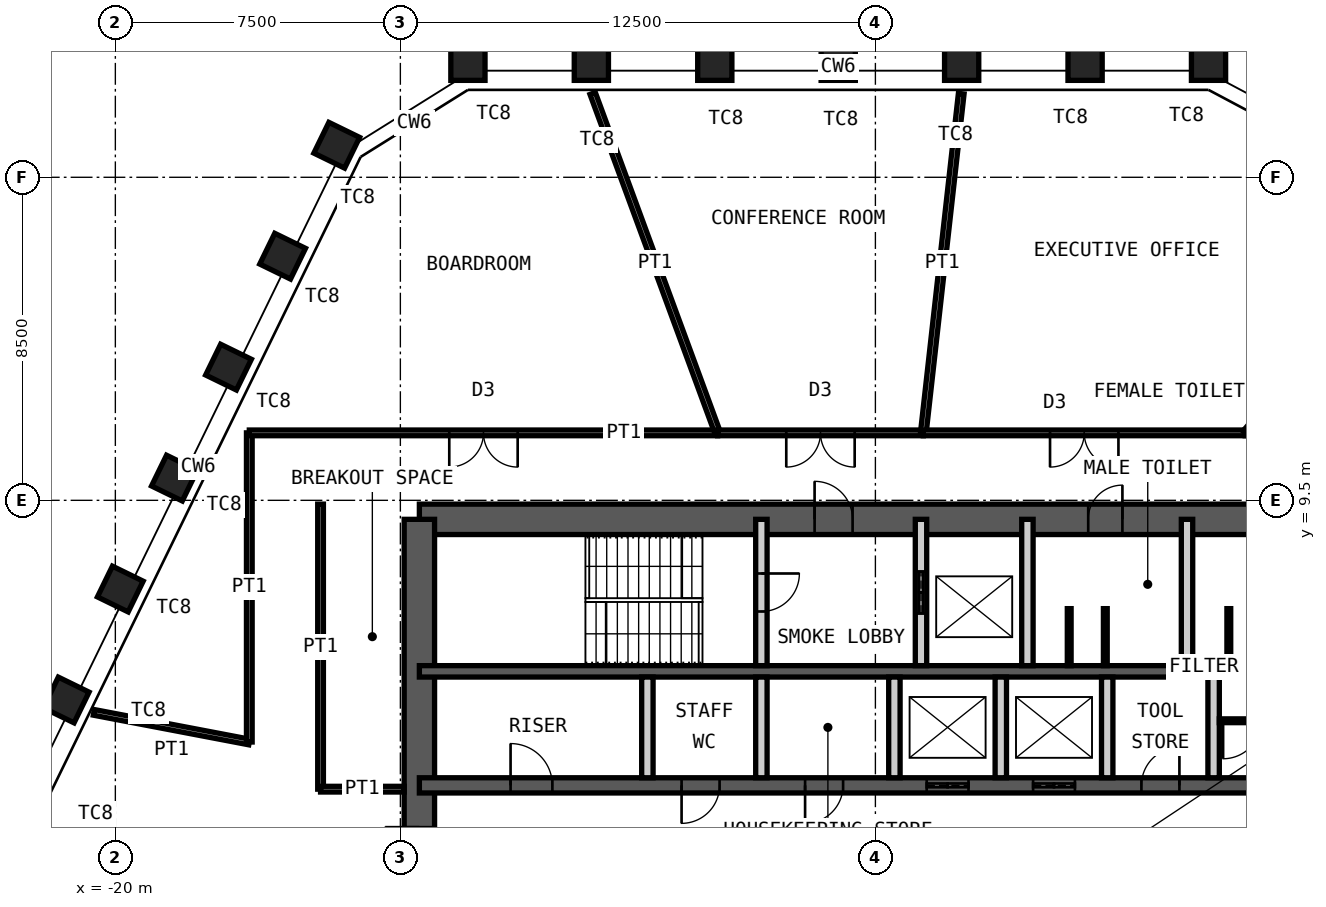
"""IFC4 building model, lengths in metres.
Left out: names, types, materials, properties, quantities, classifications, styles, units other than length and angle.
Written with IfcOpenShell. Run it as: python <this file> out.ifc"""

import sys

from ifc_helpers import new_model, si_unit, direction, frame, frame_2d, origin, origin_2d, place, context, subcontext, project, spatial, rectangle, hollow_rectangle, extrude, element, fill, save


model = new_model("IFC4")
c1 = context("Model", 3, precision=1e-05, world=origin(), true_north=direction((0.0, 1.0)))
c2 = subcontext(c1, "Body", "Model", "MODEL_VIEW")
j1 = project(units=[si_unit("LENGTHUNIT", "METRE"), si_unit("PLANEANGLEUNIT", "RADIAN")], contexts=[c1])
p1 = place(None, origin())
s1 = spatial("IfcSite", under=j1, at=p1, CompositionType="ELEMENT")
p2 = place(p1, origin())
s2 = spatial("IfcBuilding", under=s1, at=p2, CompositionType="ELEMENT")
p3 = place(p2, frame((0.0, 0.0, 333.4)))
s3 = spatial("IfcBuildingStorey", under=s2, at=p3, CompositionType="ELEMENT", Elevation=333.4)
for number, where, z_axis, x_axis in (
    (1, (-10.722, 21.0, 0.0), (0.0, 0.0, 1.0), (-1.0, 0.0, 0.0)),
    (2, (-7.474, 21.0, 0.0), (0.0, 0.0, 1.0), (-1.0, 0.0, 0.0)),
    (3, (-4.226, 21.0, 0.0), (0.0, 0.0, 1.0), (-1.0, 0.0, 0.0)),
    (4, (-0.978, 21.0, 0.0), (0.0, 0.0, 1.0), (-1.0, 0.0, 0.0)),
    (5, (2.27, 21.0, 0.0), (0.0, 0.0, 1.0), (-1.0, 0.0, 0.0)),
    (6, (5.518, 21.0, 0.0), (0.0, 0.0, 1.0), (-1.0, 0.0, 0.0)),
    (7, (8.766, 21.0, 0.0), (0.0, 0.0, 1.0), (-1.0, 0.0, 0.0)),
    (8, (-21.293, 4.246, 0.0), (0.0, 0.0, 1.0), (-0.438, -0.899, 0.0)),
    (9, (-19.87, 7.166, 0.0), (0.0, 0.0, 1.0), (-0.438, -0.899, 0.0)),
    (10, (-18.446, 10.085, 0.0), (0.0, 0.0, 1.0), (-0.438, -0.899, 0.0)),
    (11, (-17.022, 13.004, 0.0), (0.0, 0.0, 1.0), (-0.438, -0.899, 0.0)),
    (12, (-15.598, 15.924, 0.0), (0.0, 0.0, 1.0), (-0.438, -0.899, 0.0)),
    (13, (-14.174, 18.843, 0.0), (0.0, 0.0, 1.0), (-0.438, -0.899, 0.0)),
):
    element("IfcColumn", number, at=place(p3, frame(where, z_axis=z_axis, x_axis=x_axis)), inside=s3, PredefinedType="COLUMN", context=c2, shape_type="SweptSolid", body=[
        extrude(hollow_rectangle(XDim=0.9, YDim=0.9, WallThickness=0.05, at=origin_2d()), origin(), (0.0, 0.0, 1.0), 4.2),
    ])
p4 = place(p3, frame((-12.0, 9.0, 0.0), z_axis=(0.0, 0.0, 1.0), x_axis=(1.0, 0.0, 0.0)))
e14 = element("IfcWall", 14, at=p4, inside=s3, PredefinedType="SHEAR", context=c2, shape_type="SweptSolid", body=[
    extrude(rectangle(XDim=24.0, YDim=0.8, at=frame_2d((12.0, 0.0))), origin(), (0.0, 0.0, 1.0), 4.2),
])
p5 = place(p4, frame((10.4, 0.0, 0.0)))
e15 = element("IfcOpeningElement", 15, at=p5, cuts=e14, PredefinedType="OPENING", context=c2, shape_type="SweptSolid", body=[
    extrude(rectangle(XDim=1.0, YDim=2.1, at=frame_2d((0.5, 1.05))), frame((0.0, 0.41, 0.0), z_axis=(0.0, -1.0, 0.0), x_axis=(1.0, 0.0, 0.0)), (0.0, 0.0, 1.0), 0.82),
])
p6 = place(p4, frame((17.6, 0.0, 0.0)))
e16 = element("IfcOpeningElement", 16, at=p6, cuts=e14, PredefinedType="OPENING", context=c2, shape_type="SweptSolid", body=[
    extrude(rectangle(XDim=0.9, YDim=2.1, at=frame_2d((0.45, 1.05))), frame((0.0, 0.41, 0.0), z_axis=(0.0, -1.0, 0.0), x_axis=(1.0, 0.0, 0.0)), (0.0, 0.0, 1.0), 0.82),
])
p7 = place(p4, frame((21.9, 0.0, 0.0)))
e17 = element("IfcOpeningElement", 17, at=p7, cuts=e14, PredefinedType="OPENING", context=c2, shape_type="SweptSolid", body=[
    extrude(rectangle(XDim=0.9, YDim=2.1, at=frame_2d((0.45, 1.05))), frame((0.0, 0.41, 0.0), z_axis=(0.0, -1.0, 0.0), x_axis=(1.0, 0.0, 0.0)), (0.0, 0.0, 1.0), 0.82),
])
p8 = place(p3, frame((-12.0, -9.0, 0.0), z_axis=(0.0, 0.0, 1.0), x_axis=(0.0, 1.0, 0.0)))
e18 = element("IfcWall", 18, at=p8, inside=s3, PredefinedType="SHEAR", context=c2, shape_type="SweptSolid", body=[
    extrude(rectangle(XDim=18.0, YDim=0.8, at=frame_2d((9.0, 0.0))), origin(), (0.0, 0.0, 1.0), 4.2),
])
p9 = place(p8, frame((8.1, 0.0, 0.0)))
e19 = element("IfcOpeningElement", 19, at=p9, cuts=e18, PredefinedType="OPENING", context=c2, shape_type="SweptSolid", body=[
    extrude(rectangle(XDim=1.8, YDim=2.1, at=frame_2d((0.9, 1.05))), frame((0.0, 0.41, 0.0), z_axis=(0.0, -1.0, 0.0), x_axis=(1.0, 0.0, 0.0)), (0.0, 0.0, 1.0), 0.82),
])
p10 = place(p3, frame((-12.0, 5.0, 0.0), z_axis=(0.0, 0.0, 1.0), x_axis=(1.0, 0.0, 0.0)))
e20 = element("IfcWall", 20, at=p10, inside=s3, PredefinedType="SHEAR", context=c2, shape_type="SweptSolid", body=[
    extrude(rectangle(XDim=24.0, YDim=0.3, at=frame_2d((12.0, 0.0))), origin(), (0.0, 0.0, 1.0), 4.2),
])
p11 = place(p3, frame((-12.0, 2.0, 0.0), z_axis=(0.0, 0.0, 1.0), x_axis=(1.0, 0.0, 0.0)))
e21 = element("IfcWall", 21, at=p11, inside=s3, PredefinedType="SHEAR", context=c2, shape_type="SweptSolid", body=[
    extrude(rectangle(XDim=24.0, YDim=0.4, at=frame_2d((12.0, 0.0))), origin(), (0.0, 0.0, 1.0), 4.2),
])
p12 = place(p11, frame((2.4, 0.0, 0.0)))
e22 = element("IfcOpeningElement", 22, at=p12, cuts=e21, PredefinedType="OPENING", context=c2, shape_type="SweptSolid", body=[
    extrude(rectangle(XDim=1.1, YDim=2.1, at=frame_2d((0.55, 1.05))), frame((0.0, 0.21, 0.0), z_axis=(0.0, -1.0, 0.0), x_axis=(1.0, 0.0, 0.0)), (0.0, 0.0, 1.0), 0.42),
])
p13 = place(p11, frame((22.0, 0.0, 0.0)))
e23 = element("IfcOpeningElement", 23, at=p13, cuts=e21, PredefinedType="OPENING", context=c2, shape_type="SweptSolid", body=[
    extrude(rectangle(XDim=1.1, YDim=2.1, at=frame_2d((0.55, 1.05))), frame((0.0, 0.21, 0.0), z_axis=(0.0, -1.0, 0.0), x_axis=(1.0, 0.0, 0.0)), (0.0, 0.0, 1.0), 0.42),
])
p14 = place(p11, frame((10.15, 0.0, 0.0)))
e24 = element("IfcOpeningElement", 24, at=p14, cuts=e21, PredefinedType="OPENING", context=c2, shape_type="SweptSolid", body=[
    extrude(rectangle(XDim=1.0, YDim=2.1, at=frame_2d((0.5, 1.05))), frame((0.0, 0.21, 0.0), z_axis=(0.0, -1.0, 0.0), x_axis=(1.0, 0.0, 0.0)), (0.0, 0.0, 1.0), 0.42),
])
p15 = place(p11, frame((6.9, 0.0, 0.0)))
e25 = element("IfcOpeningElement", 25, at=p15, cuts=e21, PredefinedType="OPENING", context=c2, shape_type="SweptSolid", body=[
    extrude(rectangle(XDim=1.0, YDim=2.1, at=frame_2d((0.5, 1.05))), frame((0.0, 0.21, 0.0), z_axis=(0.0, -1.0, 0.0), x_axis=(1.0, 0.0, 0.0)), (0.0, 0.0, 1.0), 0.42),
])
p16 = place(p11, frame((13.35, 0.0, 0.0)))
e26 = element("IfcOpeningElement", 26, at=p16, cuts=e21, PredefinedType="OPENING", context=c2, shape_type="SweptSolid", body=[
    extrude(rectangle(XDim=1.1, YDim=2.4, at=frame_2d((0.55, 1.2))), frame((0.0, 0.21, 0.0), z_axis=(0.0, -1.0, 0.0), x_axis=(1.0, 0.0, 0.0)), (0.0, 0.0, 1.0), 0.42),
])
p17 = place(p11, frame((16.15, 0.0, 0.0)))
e27 = element("IfcOpeningElement", 27, at=p17, cuts=e21, PredefinedType="OPENING", context=c2, shape_type="SweptSolid", body=[
    extrude(rectangle(XDim=1.1, YDim=2.4, at=frame_2d((0.55, 1.2))), frame((0.0, 0.21, 0.0), z_axis=(0.0, -1.0, 0.0), x_axis=(1.0, 0.0, 0.0)), (0.0, 0.0, 1.0), 0.42),
])
p18 = place(p11, frame((19.0, 0.0, 0.0)))
e28 = element("IfcOpeningElement", 28, at=p18, cuts=e21, PredefinedType="OPENING", context=c2, shape_type="SweptSolid", body=[
    extrude(rectangle(XDim=1.0, YDim=2.1, at=frame_2d((0.5, 1.05))), frame((0.0, 0.21, 0.0), z_axis=(0.0, -1.0, 0.0), x_axis=(1.0, 0.0, 0.0)), (0.0, 0.0, 1.0), 0.42),
])
p19 = place(p3, frame((-3.0, 5.15, 0.0), z_axis=(0.0, 0.0, 1.0), x_axis=(0.0, 1.0, 0.0)))
e29 = element("IfcWall", 29, at=p19, inside=s3, PredefinedType="PARTITIONING", context=c2, shape_type="SweptSolid", body=[
    extrude(rectangle(XDim=3.85, YDim=0.3, at=frame_2d((1.925, 0.0))), origin(), (0.0, 0.0, 1.0), 3.98),
])
p20 = place(p19, frame((1.425, 0.0, 0.0)))
e30 = element("IfcOpeningElement", 30, at=p20, cuts=e29, PredefinedType="OPENING", context=c2, shape_type="SweptSolid", body=[
    extrude(rectangle(XDim=1.0, YDim=2.1, at=frame_2d((0.5, 1.05))), frame((0.0, 0.16, 0.0), z_axis=(0.0, -1.0, 0.0), x_axis=(1.0, 0.0, 0.0)), (0.0, 0.0, 1.0), 0.32),
])
p21 = place(p3, frame((1.2, 5.15, 0.0), z_axis=(0.0, 0.0, 1.0), x_axis=(0.0, 1.0, 0.0)))
e31 = element("IfcWall", 31, at=p21, inside=s3, PredefinedType="PARTITIONING", context=c2, shape_type="SweptSolid", body=[
    extrude(rectangle(XDim=3.85, YDim=0.3, at=frame_2d((1.925, 0.0))), origin(), (0.0, 0.0, 1.0), 3.98),
])
p22 = place(p21, frame((1.375, 0.0, 0.0)))
e32 = element("IfcOpeningElement", 32, at=p22, cuts=e31, PredefinedType="OPENING", context=c2, shape_type="SweptSolid", body=[
    extrude(rectangle(XDim=1.1, YDim=2.4, at=frame_2d((0.55, 1.2))), frame((0.0, 0.16, 0.0), z_axis=(0.0, -1.0, 0.0), x_axis=(1.0, 0.0, 0.0)), (0.0, 0.0, 1.0), 0.32),
])
for number, where, z_axis, x_axis in (
    (33, (4.0, 5.15, 0.0), (0.0, 0.0, 1.0), (0.0, 1.0, 0.0)),
    (34, (8.2, 5.15, 0.0), (0.0, 0.0, 1.0), (0.0, 1.0, 0.0)),
):
    element("IfcWall", number, at=place(p3, frame(where, z_axis=z_axis, x_axis=x_axis)), inside=s3, PredefinedType="PARTITIONING", context=c2, shape_type="SweptSolid", body=[
        extrude(rectangle(XDim=3.85, YDim=0.3, at=frame_2d((1.925, 0.0))), origin(), (0.0, 0.0, 1.0), 3.98),
    ])
for number, where, z_axis, x_axis in (
    (35, (-6.0, 2.2, 0.0), (0.0, 0.0, 1.0), (0.0, 1.0, 0.0)),
    (36, (-3.0, 2.2, 0.0), (0.0, 0.0, 1.0), (0.0, 1.0, 0.0)),
    (37, (0.5, 2.2, 0.0), (0.0, 0.0, 1.0), (0.0, 1.0, 0.0)),
    (38, (3.3, 2.2, 0.0), (0.0, 0.0, 1.0), (0.0, 1.0, 0.0)),
    (39, (6.1, 2.2, 0.0), (0.0, 0.0, 1.0), (0.0, 1.0, 0.0)),
    (40, (8.9, 2.2, 0.0), (0.0, 0.0, 1.0), (0.0, 1.0, 0.0)),
):
    element("IfcWall", number, at=place(p3, frame(where, z_axis=z_axis, x_axis=x_axis)), inside=s3, PredefinedType="PARTITIONING", context=c2, shape_type="SweptSolid", body=[
        extrude(rectangle(XDim=2.65, YDim=0.3, at=frame_2d((1.325, 0.0))), origin(), (0.0, 0.0, 1.0), 3.98),
    ])
p23 = place(p3, frame((9.05, 3.7, 0.0), z_axis=(0.0, 0.0, 1.0), x_axis=(1.0, 0.0, 0.0)))
e41 = element("IfcWall", 41, at=p23, inside=s3, PredefinedType="PARTITIONING", context=c2, shape_type="SweptSolid", body=[
    extrude(rectangle(XDim=2.55, YDim=0.1, at=frame_2d((1.275, 0.0))), origin(), (0.0, 0.0, 1.0), 3.98),
])
p24 = place(p23, frame((0.1, 0.0, 0.0)))
e42 = element("IfcOpeningElement", 42, at=p24, cuts=e41, PredefinedType="OPENING", context=c2, shape_type="SweptSolid", body=[
    extrude(rectangle(XDim=1.0, YDim=2.4, at=frame_2d((0.5, 1.2))), frame((0.0, 0.06, 0.0), z_axis=(0.0, -1.0, 0.0), x_axis=(1.0, 0.0, 0.0)), (0.0, 0.0, 1.0), 0.12),
])
for number, where, z_axis, x_axis in (
    (43, (5.1, 5.15, 0.0), (0.0, 0.0, 1.0), (0.0, 1.0, 0.0)),
    (44, (6.05, 5.15, 0.0), (0.0, 0.0, 1.0), (0.0, 1.0, 0.0)),
    (45, (9.3, 5.15, 0.0), (0.0, 0.0, 1.0), (0.0, 1.0, 0.0)),
):
    element("IfcWall", number, at=place(p3, frame(where, z_axis=z_axis, x_axis=x_axis)), inside=s3, PredefinedType="PARTITIONING", context=c2, shape_type="SweptSolid", body=[
        extrude(rectangle(XDim=1.5, YDim=0.1, at=frame_2d((0.75, 0.0))), origin(), (0.0, 0.0, 1.0), 2.1),
    ])
p25 = place(p3, frame((-20.566, 3.921, 0.0), z_axis=(0.0, 0.0, 1.0), x_axis=(0.982304172816, -0.187292584123, 0.0)))
e46 = element("IfcWall", 46, at=p25, inside=s3, PredefinedType="PARTITIONING", context=c2, shape_type="SweptSolid", body=[
    extrude(rectangle(XDim=4.165, YDim=0.15, at=frame_2d((2.083, 0.0))), origin(), (0.0, 0.0, 1.0), 3.02),
])
p26 = place(p3, frame((-16.475, 3.141, 0.0), z_axis=(0.0, 0.0, 1.0), x_axis=(0.0, 1.0, 0.0)))
e47 = element("IfcWall", 47, at=p26, inside=s3, PredefinedType="PARTITIONING", context=c2, shape_type="SweptSolid", body=[
    extrude(rectangle(XDim=8.134, YDim=0.15, at=frame_2d((4.067, 0.0))), origin(), (0.0, 0.0, 1.0), 3.92),
])
p27 = place(p3, frame((-16.475, 11.275, 0.0), z_axis=(0.0, 0.0, 1.0), x_axis=(1.0, 0.0, 0.0)))
e48 = element("IfcWall", 48, at=p27, inside=s3, PredefinedType="PARTITIONING", context=c2, shape_type="SweptSolid", body=[
    extrude(rectangle(XDim=12.324, YDim=0.15, at=frame_2d((6.162, 0.0))), origin(), (0.0, 0.0, 1.0), 3.92),
])
p28 = place(p27, frame((5.262, 0.0, 0.0)))
e49 = element("IfcOpeningElement", 49, at=p28, cuts=e48, PredefinedType="OPENING", context=c2, shape_type="SweptSolid", body=[
    extrude(rectangle(XDim=1.8, YDim=2.4, at=frame_2d((0.9, 1.2))), frame((0.0, 0.085, 0.0), z_axis=(0.0, -1.0, 0.0), x_axis=(1.0, 0.0, 0.0)), (0.0, 0.0, 1.0), 0.17),
])
p29 = place(p3, frame((-7.44, 20.206, 0.0), z_axis=(0.0, 0.0, 1.0), x_axis=(0.345511582319, -0.93841448544, 0.0)))
e50 = element("IfcWall", 50, at=p29, inside=s3, PredefinedType="PARTITIONING", context=c2, shape_type="SweptSolid", body=[
    extrude(rectangle(XDim=9.517, YDim=0.15, at=frame_2d((4.759, 0.0))), origin(), (0.0, 0.0, 1.0), 3.02),
])
p30 = place(p3, frame((-4.151, 11.275, 0.0), z_axis=(0.0, 0.0, 1.0), x_axis=(1.0, 0.0, 0.0)))
e51 = element("IfcWall", 51, at=p30, inside=s3, PredefinedType="PARTITIONING", context=c2, shape_type="SweptSolid", body=[
    extrude(rectangle(XDim=5.412, YDim=0.15, at=frame_2d((2.706, 0.0))), origin(), (0.0, 0.0, 1.0), 3.92),
])
p31 = place(p30, frame((1.806, 0.0, 0.0)))
e52 = element("IfcOpeningElement", 52, at=p31, cuts=e51, PredefinedType="OPENING", context=c2, shape_type="SweptSolid", body=[
    extrude(rectangle(XDim=1.8, YDim=2.4, at=frame_2d((0.9, 1.2))), frame((0.0, 0.085, 0.0), z_axis=(0.0, -1.0, 0.0), x_axis=(1.0, 0.0, 0.0)), (0.0, 0.0, 1.0), 0.17),
])
p32 = place(p3, frame((2.259, 20.201, 0.0), z_axis=(0.0, 0.0, 1.0), x_axis=(-0.111123668582, -0.993806585952, 0.0)))
e53 = element("IfcWall", 53, at=p32, inside=s3, PredefinedType="PARTITIONING", context=c2, shape_type="SweptSolid", body=[
    extrude(rectangle(XDim=8.981, YDim=0.15, at=frame_2d((4.491, 0.0))), origin(), (0.0, 0.0, 1.0), 2.72),
])
p33 = place(p3, frame((1.261, 11.275, 0.0), z_axis=(0.0, 0.0, 1.0), x_axis=(1.0, 0.0, 0.0)))
e54 = element("IfcWall", 54, at=p33, inside=s3, PredefinedType="PARTITIONING", context=c2, shape_type="SweptSolid", body=[
    extrude(rectangle(XDim=8.469, YDim=0.15, at=frame_2d((4.235, 0.0))), origin(), (0.0, 0.0, 1.0), 3.92),
])
p34 = place(p33, frame((3.335, 0.0, 0.0)))
e55 = element("IfcOpeningElement", 55, at=p34, cuts=e54, PredefinedType="OPENING", context=c2, shape_type="SweptSolid", body=[
    extrude(rectangle(XDim=1.8, YDim=2.4, at=frame_2d((0.9, 1.2))), frame((0.0, 0.085, 0.0), z_axis=(0.0, -1.0, 0.0), x_axis=(1.0, 0.0, 0.0)), (0.0, 0.0, 1.0), 0.17),
])
p35 = place(p3, frame((13.678, 15.85, 0.0), z_axis=(0.0, 0.0, 1.0), x_axis=(-0.65333269737, -0.757070925704, 0.0)))
e56 = element("IfcWall", 56, at=p35, inside=s3, PredefinedType="PARTITIONING", context=c2, shape_type="SweptSolid", body=[
    extrude(rectangle(XDim=6.044, YDim=0.15, at=frame_2d((3.022, 0.0))), origin(), (0.0, 0.0, 1.0), 2.72),
])
p36 = place(p3, frame((9.73, 11.275, 0.0), z_axis=(0.0, 0.0, 1.0), x_axis=(1.0, 0.0, 0.0)))
e57 = element("IfcWall", 57, at=p36, inside=s3, PredefinedType="PARTITIONING", context=c2, shape_type="SweptSolid", body=[
    extrude(rectangle(XDim=6.745, YDim=0.15, at=frame_2d((3.373, 0.0))), origin(), (0.0, 0.0, 1.0), 3.92),
])
p37 = place(p3, frame((-14.6, 1.9, 0.0), z_axis=(0.0, 0.0, 1.0), x_axis=(0.0, 1.0, 0.0)))
e58 = element("IfcWall", 58, at=p37, inside=s3, PredefinedType="PARTITIONING", context=c2, shape_type="SweptSolid", body=[
    extrude(rectangle(XDim=7.5, YDim=0.15, at=frame_2d((3.75, 0.0))), origin(), (0.0, 0.0, 1.0), 3.92),
])
p38 = place(p3, frame((-12.4, 1.9, 0.0), z_axis=(0.0, 0.0, 1.0), x_axis=(-1.0, 0.0, 0.0)))
e59 = element("IfcWall", 59, at=p38, inside=s3, PredefinedType="PARTITIONING", context=c2, shape_type="SweptSolid", body=[
    extrude(rectangle(XDim=2.2, YDim=0.15, at=frame_2d((1.1, 0.0))), origin(), (0.0, 0.0, 1.0), 3.12),
])
p39 = place(p5, origin())
e60 = element("IfcDoor", 60, at=p39, inside=s3, OperationType="SINGLE_SWING_RIGHT", PredefinedType="DOOR", context=c2, shape_type="SweptSolid", body=[
    extrude(rectangle(XDim=1.0, YDim=2.1, at=frame_2d((0.5, 1.05))), frame((0.0, 0.025, 0.0), z_axis=(0.0, -1.0, 0.0), x_axis=(1.0, 0.0, 0.0)), (0.0, 0.0, 1.0), 0.05),
])
fill(e15, e60)
p40 = place(p6, origin())
e61 = element("IfcDoor", 61, at=p40, inside=s3, OperationType="SINGLE_SWING_LEFT", PredefinedType="DOOR", context=c2, shape_type="SweptSolid", body=[
    extrude(rectangle(XDim=0.9, YDim=2.1, at=frame_2d((0.45, 1.05))), frame((0.0, 0.025, 0.0), z_axis=(0.0, -1.0, 0.0), x_axis=(1.0, 0.0, 0.0)), (0.0, 0.0, 1.0), 0.05),
])
fill(e16, e61)
p41 = place(p20, origin())
e62 = element("IfcDoor", 62, at=p41, inside=s3, OperationType="SINGLE_SWING_RIGHT", PredefinedType="DOOR", context=c2, shape_type="SweptSolid", body=[
    extrude(rectangle(XDim=1.0, YDim=2.1, at=frame_2d((0.5, 1.05))), frame((0.0, 0.025, 0.0), z_axis=(0.0, -1.0, 0.0), x_axis=(1.0, 0.0, 0.0)), (0.0, 0.0, 1.0), 0.05),
])
fill(e30, e62)
p42 = place(p12, origin())
e63 = element("IfcDoor", 63, at=p42, inside=s3, OperationType="SINGLE_SWING_RIGHT", PredefinedType="DOOR", context=c2, shape_type="SweptSolid", body=[
    extrude(rectangle(XDim=1.1, YDim=2.1, at=frame_2d((0.55, 1.05))), frame((0.0, 0.025, 0.0), z_axis=(0.0, -1.0, 0.0), x_axis=(1.0, 0.0, 0.0)), (0.0, 0.0, 1.0), 0.05),
])
fill(e22, e63)
p43 = place(p14, origin())
e64 = element("IfcDoor", 64, at=p43, inside=s3, OperationType="SINGLE_SWING_LEFT", PredefinedType="DOOR", context=c2, shape_type="SweptSolid", body=[
    extrude(rectangle(XDim=1.0, YDim=2.1, at=frame_2d((0.5, 1.05))), frame((0.0, 0.025, 0.0), z_axis=(0.0, -1.0, 0.0), x_axis=(1.0, 0.0, 0.0)), (0.0, 0.0, 1.0), 0.05),
])
fill(e24, e64)
p44 = place(p9, origin())
e65 = element("IfcDoor", 65, at=p44, inside=s3, OperationType="DOUBLE_DOOR_DOUBLE_SWING", PredefinedType="DOOR", context=c2, shape_type="SweptSolid", body=[
    extrude(rectangle(XDim=1.8, YDim=2.1, at=frame_2d((0.9, 1.05))), frame((0.0, 0.025, 0.0), z_axis=(0.0, -1.0, 0.0), x_axis=(1.0, 0.0, 0.0)), (0.0, 0.0, 1.0), 0.05),
])
fill(e19, e65)
p45 = place(p22, origin())
e66 = element("IfcDoor", 66, at=p45, inside=s3, OperationType="DOUBLE_DOOR_SLIDING", PredefinedType="DOOR", context=c2, shape_type="SweptSolid", body=[
    extrude(rectangle(XDim=1.1, YDim=2.4, at=frame_2d((0.55, 1.2))), frame((0.0, 0.025, 0.0), z_axis=(0.0, -1.0, 0.0), x_axis=(1.0, 0.0, 0.0)), (0.0, 0.0, 1.0), 0.05),
])
fill(e32, e66)
p46 = place(p15, origin())
e67 = element("IfcDoor", 67, at=p46, inside=s3, OperationType="SINGLE_SWING_LEFT", PredefinedType="DOOR", context=c2, shape_type="SweptSolid", body=[
    extrude(rectangle(XDim=1.0, YDim=2.1, at=frame_2d((0.5, 1.05))), frame((0.0, 0.025, 0.0), z_axis=(0.0, -1.0, 0.0), x_axis=(1.0, 0.0, 0.0)), (0.0, 0.0, 1.0), 0.05),
])
fill(e25, e67)
p47 = place(p16, origin())
e68 = element("IfcDoor", 68, at=p47, inside=s3, OperationType="DOUBLE_DOOR_SLIDING", PredefinedType="DOOR", context=c2, shape_type="SweptSolid", body=[
    extrude(rectangle(XDim=1.1, YDim=2.4, at=frame_2d((0.55, 1.2))), frame((0.0, 0.025, 0.0), z_axis=(0.0, -1.0, 0.0), x_axis=(1.0, 0.0, 0.0)), (0.0, 0.0, 1.0), 0.05),
])
fill(e26, e68)
p48 = place(p17, origin())
e69 = element("IfcDoor", 69, at=p48, inside=s3, OperationType="DOUBLE_DOOR_SLIDING", PredefinedType="DOOR", context=c2, shape_type="SweptSolid", body=[
    extrude(rectangle(XDim=1.1, YDim=2.4, at=frame_2d((0.55, 1.2))), frame((0.0, 0.025, 0.0), z_axis=(0.0, -1.0, 0.0), x_axis=(1.0, 0.0, 0.0)), (0.0, 0.0, 1.0), 0.05),
])
fill(e27, e69)
p49 = place(p18, origin())
e70 = element("IfcDoor", 70, at=p49, inside=s3, OperationType="SINGLE_SWING_LEFT", PredefinedType="DOOR", context=c2, shape_type="SweptSolid", body=[
    extrude(rectangle(XDim=1.0, YDim=2.1, at=frame_2d((0.5, 1.05))), frame((0.0, 0.025, 0.0), z_axis=(0.0, -1.0, 0.0), x_axis=(1.0, 0.0, 0.0)), (0.0, 0.0, 1.0), 0.05),
])
fill(e28, e70)
p50 = place(p24, origin())
e71 = element("IfcDoor", 71, at=p50, inside=s3, OperationType="SINGLE_SWING_LEFT", PredefinedType="DOOR", context=c2, shape_type="SweptSolid", body=[
    extrude(rectangle(XDim=1.0, YDim=2.4, at=frame_2d((0.5, 1.2))), frame((0.0, 0.025, 0.0), z_axis=(0.0, -1.0, 0.0), x_axis=(1.0, 0.0, 0.0)), (0.0, 0.0, 1.0), 0.05),
])
fill(e42, e71)
p51 = place(p28, origin())
e72 = element("IfcDoor", 72, at=p51, inside=s3, OperationType="DOUBLE_DOOR_DOUBLE_SWING", PredefinedType="DOOR", context=c2, shape_type="SweptSolid", body=[
    extrude(rectangle(XDim=1.8, YDim=2.4, at=frame_2d((0.9, 1.2))), frame((0.0, 0.025, 0.0), z_axis=(0.0, -1.0, 0.0), x_axis=(1.0, 0.0, 0.0)), (0.0, 0.0, 1.0), 0.05),
])
fill(e49, e72)
p52 = place(p31, origin())
e73 = element("IfcDoor", 73, at=p52, inside=s3, OperationType="DOUBLE_DOOR_DOUBLE_SWING", PredefinedType="DOOR", context=c2, shape_type="SweptSolid", body=[
    extrude(rectangle(XDim=1.8, YDim=2.4, at=frame_2d((0.9, 1.2))), frame((0.0, 0.025, 0.0), z_axis=(0.0, -1.0, 0.0), x_axis=(1.0, 0.0, 0.0)), (0.0, 0.0, 1.0), 0.05),
])
fill(e52, e73)
p53 = place(p34, origin())
e74 = element("IfcDoor", 74, at=p53, inside=s3, OperationType="DOUBLE_DOOR_DOUBLE_SWING", PredefinedType="DOOR", context=c2, shape_type="SweptSolid", body=[
    extrude(rectangle(XDim=1.8, YDim=2.4, at=frame_2d((0.9, 1.2))), frame((0.0, 0.025, 0.0), z_axis=(0.0, -1.0, 0.0), x_axis=(1.0, 0.0, 0.0)), (0.0, 0.0, 1.0), 0.05),
])
fill(e55, e74)
save(model, sys.argv[1])
